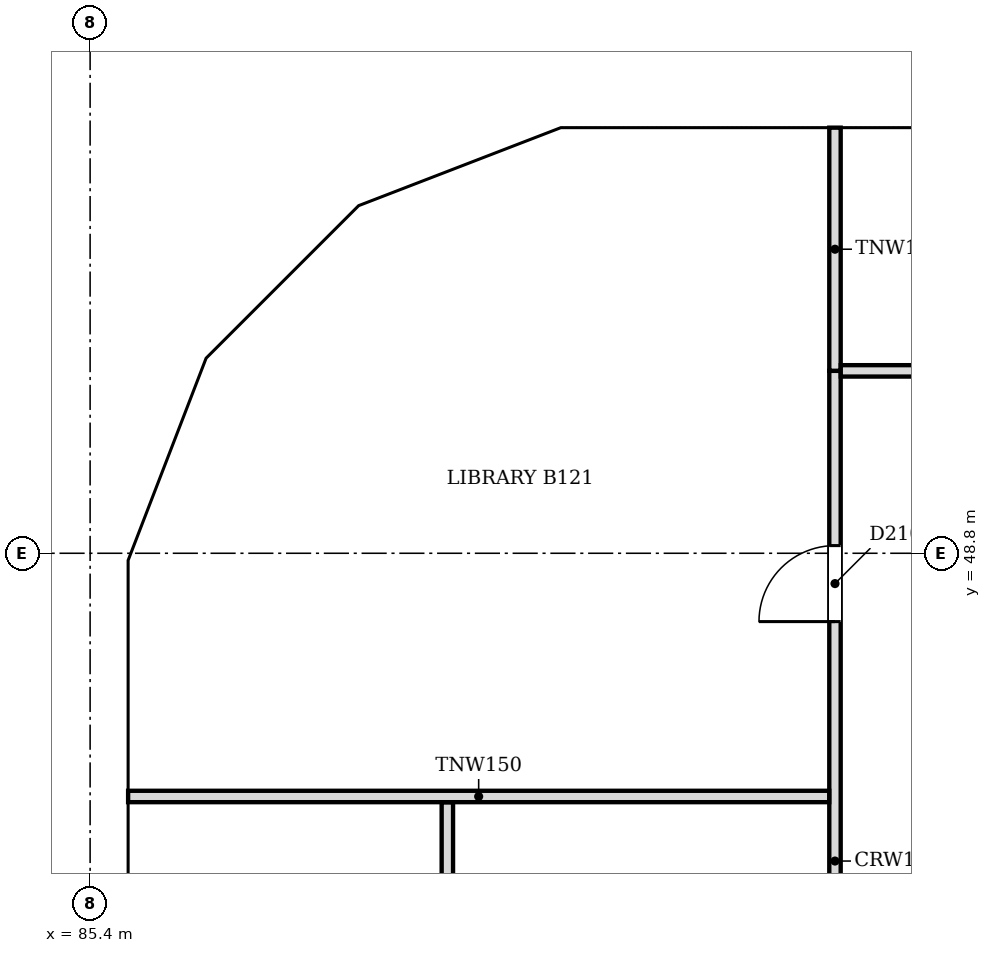
"""IFC4 building model, lengths in metres.
Left out: names, types, materials, properties, quantities, classifications, styles, units other than length and angle.
Written with IfcOpenShell. Run it as: python <this file> out.ifc"""

import sys

from ifc_helpers import new_model, si_unit, direction, frame, frame_2d, origin, place, context, subcontext, project, spatial, polyline, rectangle, outline, extrude, faceted_brep, source, transform, mapped, element, fill, save


model = new_model("IFC4")
c1 = context("Model", 3, precision=1e-05, world=origin(), true_north=direction((0.0, 1.0)))
c2 = subcontext(c1, "Body", "Model", "MODEL_VIEW")
j1 = project(units=[si_unit("LENGTHUNIT", "METRE"), si_unit("PLANEANGLEUNIT", "RADIAN")], contexts=[c1])
p1 = place(None, origin())
s1 = spatial("IfcSite", under=j1, at=p1, CompositionType="ELEMENT")
p2 = place(p1, origin())
s2 = spatial("IfcBuilding", under=s1, at=p2, CompositionType="ELEMENT")
p3 = place(p2, frame((0.0, 0.0, 99.0)))
s3 = spatial("IfcBuildingStorey", under=s2, at=p3, CompositionType="ELEMENT", Elevation=99.0)
m1 = source(origin(), c2, "Body", "Brep", [
    faceted_brep([(3.05, -0.25, 0.0), (6.053, -0.25, 3.8), (3.05, -0.25, 7.6), (0.0, -0.25, 3.8), (0.0, 0.25, 3.8), (3.05, 0.25, 7.6), (6.007, 0.25, 3.859), (6.007, 0.25, 3.741), (3.05, 0.25, 0.0), (6.053, 0.0, 3.8)], [[[0, 1, 2, 3]], [[4, 5, 6, 7, 8]], [[8, 7, 9, 1, 0]], [[6, 5, 2, 1, 9]], [[5, 4, 3, 2]], [[4, 8, 0, 3]], [[9, 7, 6]]]),
])
p4 = place(p3, frame((97.6, 54.65, -3.8), z_axis=(0.0, 0.0, 1.0), x_axis=(-1.0, 0.0, 0.0)))
e1 = element("IfcWall", 1, at=p4, inside=s3, PredefinedType="SOLIDWALL", context=c2, shape_type="MappedRepresentation", body=[
    mapped(m1, transform((0.0, 0.0, 0.0), scale=1.0)),
])
m2 = source(origin(), c2, "Body", "SweptSolid", [
    extrude(outline(polyline([(3.049, 0.401), (5.735, 3.8), (3.049, 7.199), (0.321, 3.8), (3.049, 0.401)])), frame((0.0, 0.26, 0.0), z_axis=(0.0, -1.0, 0.0), x_axis=(1.0, 0.0, 0.0)), (0.0, 0.0, 1.0), 0.52),
])
p5 = place(p4, origin())
e2 = element("IfcOpeningElement", 2, at=p5, cuts=e1, PredefinedType="OPENING", context=c2, shape_type="MappedRepresentation", body=[
    mapped(m2, transform((0.0, 0.0, 0.0), scale=1.0)),
])
m3 = source(origin(), c2, "Body", "Brep", [
    faceted_brep([(2.95, -0.25, 0.0), (3.003, -0.25, 0.068), (3.003, -0.25, 7.532), (2.95, -0.25, 7.6), (0.0, -0.25, 3.8), (0.047, 0.25, 3.86), (2.898, 0.25, 7.532), (2.898, 0.25, 0.068), (0.047, 0.25, 3.74), (2.95, 0.0, 0.0), (2.95, 0.0, 7.6), (0.0, 0.0, 3.8)], [[[0, 1, 2, 3, 4]], [[5, 6, 7, 8]], [[1, 0, 9]], [[10, 3, 2]], [[6, 5, 11, 4, 3, 10]], [[8, 7, 9, 0, 4, 11]], [[8, 11, 5]], [[1, 9, 7, 6, 10, 2]]]),
])
p6 = place(p3, frame((91.547, 54.65, -3.8), z_axis=(0.0, 0.0, 1.0), x_axis=(-0.933007896601, -0.359855894603, 0.0)))
e3 = element("IfcWall", 3, at=p6, inside=s3, PredefinedType="SOLIDWALL", context=c2, shape_type="MappedRepresentation", body=[
    mapped(m3, transform((0.0, 0.0, 0.0), scale=1.0)),
])
m4 = source(origin(), c2, "Body", "SweptSolid", [
    extrude(outline(polyline([(2.75, 6.935), (0.316, 3.8), (2.75, 0.665), (2.75, 6.935)])), frame((0.0, 0.26, 0.0), z_axis=(0.0, -1.0, 0.0), x_axis=(1.0, 0.0, 0.0)), (0.0, 0.0, 1.0), 0.52),
])
p7 = place(p6, origin())
e4 = element("IfcOpeningElement", 4, at=p7, cuts=e3, PredefinedType="OPENING", context=c2, shape_type="MappedRepresentation", body=[
    mapped(m4, transform((0.0, 0.0, 0.0), scale=1.0)),
])
m5 = source(origin(), c2, "Body", "Brep", [
    faceted_brep([(0.053, -0.25, 0.0), (2.997, -0.25, 3.8), (0.053, -0.25, 7.6), (0.0, -0.25, 7.532), (0.0, -0.25, 0.068), (0.106, 0.25, 7.532), (2.944, 0.25, 3.868), (2.944, 0.25, 3.732), (0.106, 0.25, 0.068), (2.997, 0.0, 3.8), (0.053, 0.0, 0.0), (0.053, 0.0, 7.6)], [[[0, 1, 2, 3, 4]], [[5, 6, 7, 8]], [[8, 7, 9, 1, 0, 10]], [[6, 5, 11, 2, 1, 9]], [[3, 2, 11]], [[10, 0, 4]], [[8, 10, 4, 3, 11, 5]], [[9, 7, 6]]]),
])
p8 = place(p3, frame((88.831, 53.625, -3.8), z_axis=(0.0, 0.0, 1.0), x_axis=(-0.707147509625, -0.707066050402, 0.0)))
e5 = element("IfcWall", 5, at=p8, inside=s3, PredefinedType="SOLIDWALL", context=c2, shape_type="MappedRepresentation", body=[
    mapped(m5, transform((0.0, 0.0, 0.0), scale=1.0)),
])
m6 = source(origin(), c2, "Body", "SweptSolid", [
    extrude(outline(polyline([(0.253, 0.666), (2.681, 3.8), (0.253, 6.934), (0.253, 0.666)])), frame((0.0, 0.26, 0.0), z_axis=(0.0, -1.0, 0.0), x_axis=(1.0, 0.0, 0.0)), (0.0, 0.0, 1.0), 0.52),
])
p9 = place(p8, origin())
e6 = element("IfcOpeningElement", 6, at=p9, cuts=e5, PredefinedType="OPENING", context=c2, shape_type="MappedRepresentation", body=[
    mapped(m6, transform((0.0, 0.0, 0.0), scale=1.0)),
])
m7 = source(origin(), c2, "Body", "Brep", [
    faceted_brep([(2.95, -0.25, 0.0), (2.997, -0.25, 0.059), (2.997, -0.25, 7.541), (2.95, -0.25, 7.6), (0.0, -0.25, 3.8), (0.053, 0.25, 3.868), (2.904, 0.25, 7.54), (2.904, 0.25, 0.06), (0.053, 0.25, 3.732), (2.95, 0.0, 0.0), (2.95, 0.0, 7.6), (0.0, 0.0, 3.8)], [[[0, 1, 2, 3, 4]], [[5, 6, 7, 8]], [[1, 0, 9]], [[10, 3, 2]], [[6, 5, 11, 4, 3, 10]], [[8, 7, 9, 0, 4, 11]], [[8, 11, 5]], [[1, 9, 7, 6, 10, 2]]]),
])
p10 = place(p3, frame((86.712, 51.506, -3.8), z_axis=(0.0, 0.0, 1.0), x_axis=(-0.359874094142, -0.933000876937, 0.0)))
e7 = element("IfcWall", 7, at=p10, inside=s3, PredefinedType="SOLIDWALL", context=c2, shape_type="MappedRepresentation", body=[
    mapped(m7, transform((0.0, 0.0, 0.0), scale=1.0)),
])
p11 = place(p10, origin())
e8 = element("IfcOpeningElement", 8, at=p11, cuts=e7, PredefinedType="OPENING", context=c2, shape_type="MappedRepresentation", body=[
    mapped(m4, transform((0.0, 0.0, 0.0), scale=1.0)),
])
m8 = source(origin(), c2, "Body", "Brep", [
    faceted_brep([(0.047, -0.25, 0.0), (3.05, -0.25, 3.8), (0.047, -0.25, 7.6), (0.0, -0.25, 7.54), (0.0, -0.25, 0.06), (0.093, 0.25, 7.541), (3.05, 0.25, 3.8), (0.093, 0.25, 0.059), (0.047, 0.0, 0.0), (0.047, 0.0, 7.6)], [[[0, 1, 2, 3, 4]], [[5, 6, 7]], [[7, 6, 1, 0, 8]], [[6, 5, 9, 2, 1]], [[3, 2, 9]], [[8, 0, 4]], [[7, 8, 4, 3, 9, 5]]]),
])
p12 = place(p3, frame((85.65, 48.8, -3.8), z_axis=(0.0, 0.0, 1.0), x_axis=(0.0, -1.0, 0.0)))
e9 = element("IfcWall", 9, at=p12, inside=s3, PredefinedType="SOLIDWALL", context=c2, shape_type="MappedRepresentation", body=[
    mapped(m8, transform((0.0, 0.0, 0.0), scale=1.0)),
])
m9 = source(origin(), c2, "Body", "SweptSolid", [
    extrude(outline(polyline([(0.247, 0.656), (2.731, 3.8), (0.247, 6.944), (0.247, 0.656)])), frame((0.0, 0.26, 0.0), z_axis=(0.0, -1.0, 0.0), x_axis=(1.0, 0.0, 0.0)), (0.0, 0.0, 1.0), 0.52),
])
p13 = place(p12, origin())
e10 = element("IfcOpeningElement", 10, at=p13, cuts=e9, PredefinedType="OPENING", context=c2, shape_type="MappedRepresentation", body=[
    mapped(m9, transform((0.0, 0.0, 0.0), scale=1.0)),
])
m10 = source(origin(), c2, "Body", "SweptSolid", [
    extrude(outline(polyline([(3.05, 0.0), (6.1, 3.8), (3.05, 7.6), (0.0, 3.8), (3.05, 0.0)])), frame((0.0, 0.25, 0.0), z_axis=(0.0, -1.0, 0.0), x_axis=(1.0, 0.0, 0.0)), (0.0, 0.0, 1.0), 0.5),
])
p14 = place(p3, frame((85.65, 45.75, -3.8), z_axis=(0.0, 0.0, 1.0), x_axis=(0.0, -1.0, 0.0)))
e11 = element("IfcWall", 11, at=p14, inside=s3, PredefinedType="SOLIDWALL", context=c2, shape_type="MappedRepresentation", body=[
    mapped(m10, transform((0.0, 0.0, 0.0), scale=1.0)),
])
m11 = source(origin(), c2, "Body", "SweptSolid", [
    extrude(outline(polyline([(3.05, 0.399), (5.78, 3.8), (3.05, 7.201), (0.321, 3.8), (3.05, 0.399)])), frame((0.0, 0.26, 0.0), z_axis=(0.0, -1.0, 0.0), x_axis=(1.0, 0.0, 0.0)), (0.0, 0.0, 1.0), 0.52),
])
p15 = place(p14, origin())
e12 = element("IfcOpeningElement", 12, at=p15, cuts=e11, PredefinedType="OPENING", context=c2, shape_type="MappedRepresentation", body=[
    mapped(m11, transform((0.0, 0.0, 0.0), scale=1.0)),
])
p16 = place(p2, frame((0.0, 0.0, 102.8)))
s4 = spatial("IfcBuildingStorey", under=s2, at=p16, CompositionType="ELEMENT", Elevation=102.8)
m12 = source(origin(), c2, "Body", "Brep", [
    faceted_brep([(3.05, -0.25, 0.0), (6.1, -0.25, 3.8), (6.1, -0.25, 3.8), (3.05, -0.25, 7.6), (0.0, -0.25, 3.8), (0.0, 0.25, 3.8), (3.05, 0.25, 7.6), (6.1, 0.25, 3.8), (6.1, 0.25, 3.8), (3.05, 0.25, 0.0)], [[[0, 1, 2, 3, 4]], [[5, 6, 7, 8, 9]], [[9, 8, 1, 0]], [[7, 6, 3, 2]], [[6, 5, 4, 3]], [[5, 9, 0, 4]], [[1, 8, 7, 2]]]),
])
p17 = place(p16, frame((100.65, 54.65, -3.8), z_axis=(0.0, 0.0, 1.0), x_axis=(-1.0, 0.0, 0.0)))
e13 = element("IfcWall", 13, at=p17, inside=s4, PredefinedType="SOLIDWALL", context=c2, shape_type="MappedRepresentation", body=[
    mapped(m12, transform((0.0, 0.0, 0.0), scale=1.0)),
])
p18 = place(p17, origin())
e14 = element("IfcOpeningElement", 14, at=p18, cuts=e13, PredefinedType="OPENING", context=c2, shape_type="MappedRepresentation", body=[
    mapped(m11, transform((0.0, 0.0, 0.0), scale=1.0)),
])
m13 = source(origin(), c2, "Body", "Brep", [
    faceted_brep([(3.003, -0.25, 0.0), (3.05, -0.25, 0.06), (3.05, -0.25, 7.54), (3.003, -0.25, 7.6), (0.0, -0.25, 3.8), (0.0, 0.25, 3.8), (2.957, 0.25, 7.541), (2.957, 0.25, 0.059), (3.003, 0.0, 0.0), (3.003, 0.0, 7.6)], [[[0, 1, 2, 3, 4]], [[5, 6, 7]], [[1, 0, 8]], [[9, 3, 2]], [[6, 5, 4, 3, 9]], [[5, 7, 8, 0, 4]], [[1, 8, 7, 6, 9, 2]]]),
])
p19 = place(p16, frame((94.55, 54.65, -3.8), z_axis=(0.0, 0.0, 1.0), x_axis=(-1.0, 0.0, 0.0)))
e15 = element("IfcWall", 15, at=p19, inside=s4, PredefinedType="SOLIDWALL", context=c2, shape_type="MappedRepresentation", body=[
    mapped(m13, transform((0.0, 0.0, 0.0), scale=1.0)),
])
m14 = source(origin(), c2, "Body", "SweptSolid", [
    extrude(outline(polyline([(2.803, 6.944), (0.319, 3.8), (2.803, 0.656), (2.803, 6.944)])), frame((0.0, 0.26, 0.0), z_axis=(0.0, -1.0, 0.0), x_axis=(1.0, 0.0, 0.0)), (0.0, 0.0, 1.0), 0.52),
])
p20 = place(p19, origin())
e16 = element("IfcOpeningElement", 16, at=p20, cuts=e15, PredefinedType="OPENING", context=c2, shape_type="MappedRepresentation", body=[
    mapped(m14, transform((0.0, 0.0, 0.0), scale=1.0)),
])
m15 = source(origin(), c2, "Body", "Brep", [
    faceted_brep([(0.047, -0.25, 0.0), (2.997, -0.25, 3.8), (0.047, -0.25, 7.6), (0.0, -0.25, 7.541), (0.0, -0.25, 0.059), (0.093, 0.25, 7.54), (2.944, 0.25, 3.868), (2.944, 0.25, 3.732), (0.093, 0.25, 0.06), (2.997, 0.0, 3.8), (0.047, 0.0, 0.0), (0.047, 0.0, 7.6)], [[[0, 1, 2, 3, 4]], [[5, 6, 7, 8]], [[8, 7, 9, 1, 0, 10]], [[6, 5, 11, 2, 1, 9]], [[3, 2, 11]], [[10, 0, 4]], [[8, 10, 4, 3, 11, 5]], [[9, 7, 6]]]),
])
p21 = place(p16, frame((91.59, 54.667, -3.8), z_axis=(0.0, 0.0, 1.0), x_axis=(-0.933000876937, -0.359874094142, 0.0)))
e17 = element("IfcWall", 17, at=p21, inside=s4, PredefinedType="SOLIDWALL", context=c2, shape_type="MappedRepresentation", body=[
    mapped(m15, transform((0.0, 0.0, 0.0), scale=1.0)),
])
m16 = source(origin(), c2, "Body", "SweptSolid", [
    extrude(outline(polyline([(0.247, 0.665), (2.681, 3.8), (0.247, 6.935), (0.247, 0.665)])), frame((0.0, 0.26, 0.0), z_axis=(0.0, -1.0, 0.0), x_axis=(1.0, 0.0, 0.0)), (0.0, 0.0, 1.0), 0.52),
])
p22 = place(p21, origin())
e18 = element("IfcOpeningElement", 18, at=p22, cuts=e17, PredefinedType="OPENING", context=c2, shape_type="MappedRepresentation", body=[
    mapped(m16, transform((0.0, 0.0, 0.0), scale=1.0)),
])
m17 = source(origin(), c2, "Body", "Brep", [
    faceted_brep([(2.944, -0.25, 0.0), (2.997, -0.25, 0.068), (2.997, -0.25, 7.532), (2.944, -0.25, 7.6), (0.0, -0.25, 3.8), (0.053, 0.25, 3.868), (2.891, 0.25, 7.532), (2.891, 0.25, 0.068), (0.053, 0.25, 3.732), (2.944, 0.0, 0.0), (2.944, 0.0, 7.6), (0.0, 0.0, 3.8)], [[[0, 1, 2, 3, 4]], [[5, 6, 7, 8]], [[1, 0, 9]], [[10, 3, 2]], [[6, 5, 11, 4, 3, 10]], [[8, 7, 9, 0, 4, 11]], [[8, 11, 5]], [[1, 9, 7, 6, 10, 2]]]),
])
p23 = place(p16, frame((88.794, 53.588, -3.8), z_axis=(0.0, 0.0, 1.0), x_axis=(-0.707066050402, -0.707147509625, 0.0)))
e19 = element("IfcWall", 19, at=p23, inside=s4, PredefinedType="SOLIDWALL", context=c2, shape_type="MappedRepresentation", body=[
    mapped(m17, transform((0.0, 0.0, 0.0), scale=1.0)),
])
m18 = source(origin(), c2, "Body", "SweptSolid", [
    extrude(outline(polyline([(2.744, 6.934), (0.316, 3.8), (2.744, 0.666), (2.744, 6.934)])), frame((0.0, 0.26, 0.0), z_axis=(0.0, -1.0, 0.0), x_axis=(1.0, 0.0, 0.0)), (0.0, 0.0, 1.0), 0.52),
])
p24 = place(p23, origin())
e20 = element("IfcOpeningElement", 20, at=p24, cuts=e19, PredefinedType="OPENING", context=c2, shape_type="MappedRepresentation", body=[
    mapped(m18, transform((0.0, 0.0, 0.0), scale=1.0)),
])
m19 = source(origin(), c2, "Body", "Brep", [
    faceted_brep([(0.053, -0.25, 0.0), (3.003, -0.25, 3.8), (0.053, -0.25, 7.6), (0.0, -0.25, 7.532), (0.0, -0.25, 0.068), (0.106, 0.25, 7.532), (2.957, 0.25, 3.86), (2.957, 0.25, 3.74), (0.106, 0.25, 0.068), (3.003, 0.0, 3.8), (0.053, 0.0, 0.0), (0.053, 0.0, 7.6)], [[[0, 1, 2, 3, 4]], [[5, 6, 7, 8]], [[8, 7, 9, 1, 0, 10]], [[6, 5, 11, 2, 1, 9]], [[3, 2, 11]], [[10, 0, 4]], [[8, 10, 4, 3, 11, 5]], [[9, 7, 6]]]),
])
p25 = place(p16, frame((86.731, 51.556, -3.8), z_axis=(0.0, 0.0, 1.0), x_axis=(-0.359855894603, -0.933007896601, 0.0)))
e21 = element("IfcWall", 21, at=p25, inside=s4, PredefinedType="SOLIDWALL", context=c2, shape_type="MappedRepresentation", body=[
    mapped(m19, transform((0.0, 0.0, 0.0), scale=1.0)),
])
m20 = source(origin(), c2, "Body", "SweptSolid", [
    extrude(outline(polyline([(0.253, 0.665), (2.687, 3.8), (0.253, 6.935), (0.253, 0.665)])), frame((0.0, 0.26, 0.0), z_axis=(0.0, -1.0, 0.0), x_axis=(1.0, 0.0, 0.0)), (0.0, 0.0, 1.0), 0.52),
])
p26 = place(p25, origin())
e22 = element("IfcOpeningElement", 22, at=p26, cuts=e21, PredefinedType="OPENING", context=c2, shape_type="MappedRepresentation", body=[
    mapped(m20, transform((0.0, 0.0, 0.0), scale=1.0)),
])
m21 = source(origin(), c2, "Body", "Brep", [
    faceted_brep([(3.003, -0.25, 0.0), (6.053, -0.25, 3.8), (3.003, -0.25, 7.6), (0.0, -0.25, 3.8), (0.047, 0.25, 3.859), (3.003, 0.25, 7.6), (6.053, 0.25, 3.8), (3.003, 0.25, 0.0), (0.047, 0.25, 3.741), (0.0, 0.0, 3.8)], [[[0, 1, 2, 3]], [[4, 5, 6, 7, 8]], [[7, 6, 1, 0]], [[6, 5, 2, 1]], [[5, 4, 9, 3, 2]], [[8, 7, 0, 3, 9]], [[8, 9, 4]]]),
])
p27 = place(p16, frame((85.65, 48.753, -3.8), z_axis=(0.0, 0.0, 1.0), x_axis=(0.0, -1.0, 0.0)))
e23 = element("IfcWall", 23, at=p27, inside=s4, PredefinedType="SOLIDWALL", context=c2, shape_type="MappedRepresentation", body=[
    mapped(m21, transform((0.0, 0.0, 0.0), scale=1.0)),
])
m22 = source(origin(), c2, "Body", "SweptSolid", [
    extrude(outline(polyline([(3.005, 0.401), (5.733, 3.8), (3.005, 7.199), (0.319, 3.8), (3.005, 0.401)])), frame((0.0, 0.26, 0.0), z_axis=(0.0, -1.0, 0.0), x_axis=(1.0, 0.0, 0.0)), (0.0, 0.0, 1.0), 0.52),
])
p28 = place(p27, origin())
e24 = element("IfcOpeningElement", 24, at=p28, cuts=e23, PredefinedType="OPENING", context=c2, shape_type="MappedRepresentation", body=[
    mapped(m22, transform((0.0, 0.0, 0.0), scale=1.0)),
])
p29 = place(p3, frame((95.2, 36.6, 0.0), z_axis=(0.0, 0.0, 1.0), x_axis=(0.0, 1.0, 0.0)))
e25 = element("IfcWall", 25, at=p29, inside=s3, PredefinedType="PARTITIONING", context=c2, shape_type="SweptSolid", body=[
    extrude(rectangle(XDim=14.6, YDim=0.15, at=frame_2d((7.3, 0.0))), origin(), (0.0, 0.0, 1.0), 3.067),
])
m23 = source(origin(), c2, "Body", "SweptSolid", [
    extrude(rectangle(XDim=1.0, YDim=2.1, at=frame_2d((0.5, 1.05))), frame((0.0, 0.085, 0.0), z_axis=(0.0, -1.0, 0.0), x_axis=(1.0, 0.0, 0.0)), (0.0, 0.0, 1.0), 0.17),
])
p30 = place(p29, frame((11.301, 0.0, 0.0)))
e26 = element("IfcOpeningElement", 26, at=p30, cuts=e25, PredefinedType="OPENING", context=c2, shape_type="MappedRepresentation", body=[
    mapped(m23, transform((0.0, 0.0, 0.0), scale=1.0)),
])
p31 = place(p29, frame((4.0, 0.0, 0.0)))
e27 = element("IfcOpeningElement", 27, at=p31, cuts=e25, PredefinedType="OPENING", context=c2, shape_type="MappedRepresentation", body=[
    mapped(m23, transform((0.0, 0.0, 0.0), scale=1.0)),
])
p32 = place(p3, frame((90.1, 36.676, 0.0), z_axis=(0.0, 0.0, 1.0), x_axis=(0.0, 1.0, 0.0)))
e28 = element("IfcWall", 28, at=p32, inside=s3, PredefinedType="PARTITIONING", context=c2, shape_type="SweptSolid", body=[
    extrude(rectangle(XDim=8.848, YDim=0.15, at=frame_2d((4.424, 0.0))), origin(), (0.0, 0.0, 1.0), 3.067),
])
m24 = source(origin(), c2, "Body", "SweptSolid", [
    extrude(rectangle(XDim=0.9, YDim=2.1, at=frame_2d((0.45, 1.05))), frame((0.0, 0.085, 0.0), z_axis=(0.0, -1.0, 0.0), x_axis=(1.0, 0.0, 0.0)), (0.0, 0.0, 1.0), 0.17),
])
p33 = place(p32, frame((1.7, 0.0, 0.0)))
e29 = element("IfcOpeningElement", 29, at=p33, cuts=e28, PredefinedType="OPENING", context=c2, shape_type="MappedRepresentation", body=[
    mapped(m24, transform((0.0, 0.0, 0.0), scale=1.0)),
])
p34 = place(p32, frame((6.072, 0.0, 0.0)))
e30 = element("IfcOpeningElement", 30, at=p34, cuts=e28, PredefinedType="OPENING", context=c2, shape_type="MappedRepresentation", body=[
    mapped(m24, transform((0.0, 0.0, 0.0), scale=1.0)),
])
p35 = place(p3, frame((85.9, 45.6, 0.0), z_axis=(0.0, 0.0, 1.0), x_axis=(1.0, 0.0, 0.0)))
e31 = element("IfcWall", 31, at=p35, inside=s3, PredefinedType="PARTITIONING", context=c2, shape_type="SweptSolid", body=[
    extrude(rectangle(XDim=9.224, YDim=0.15, at=frame_2d((4.612, 0.0))), origin(), (0.0, 0.0, 1.0), 3.067),
])
p36 = place(p3, frame((95.2, 51.201, 0.0), z_axis=(0.0, 0.0, 1.0), x_axis=(0.0, 1.0, 0.0)))
e32 = element("IfcWall", 32, at=p36, inside=s3, PredefinedType="PARTITIONING", context=c2, shape_type="SweptSolid", body=[
    extrude(rectangle(XDim=3.199, YDim=0.15, at=frame_2d((1.6, 0.0))), origin(), (0.0, 0.0, 1.0), 3.067),
])
p37 = place(p3, frame((95.276, 51.2, 0.0), z_axis=(0.0, 0.0, 1.0), x_axis=(1.0, 0.0, 0.0)))
e33 = element("IfcWall", 33, at=p37, inside=s3, PredefinedType="PARTITIONING", context=c2, shape_type="SweptSolid", body=[
    extrude(rectangle(XDim=4.724, YDim=0.15, at=frame_2d((2.362, 0.0))), origin(), (0.0, 0.0, 1.0), 3.067),
])
p38 = place(p37, frame((1.9, 0.0, 0.0)))
e34 = element("IfcOpeningElement", 34, at=p38, cuts=e33, PredefinedType="OPENING", context=c2, shape_type="MappedRepresentation", body=[
    mapped(m24, transform((0.0, 0.0, 0.0), scale=1.0)),
])
m25 = source(origin(), c2, "Body", "SweptSolid", [
    extrude(rectangle(XDim=1.0, YDim=2.1, at=frame_2d((0.5, 1.05))), frame((0.0, 0.025, 0.0), z_axis=(0.0, -1.0, 0.0), x_axis=(1.0, 0.0, 0.0)), (0.0, 0.0, 1.0), 0.05),
])
p39 = place(p30, origin())
e35 = element("IfcDoor", 35, at=p39, inside=s3, OperationType="SINGLE_SWING_LEFT", PredefinedType="DOOR", context=c2, shape_type="MappedRepresentation", body=[
    mapped(m25, transform((0.0, 0.0, 0.0), scale=1.0)),
])
fill(e26, e35)
save(model, sys.argv[1])
